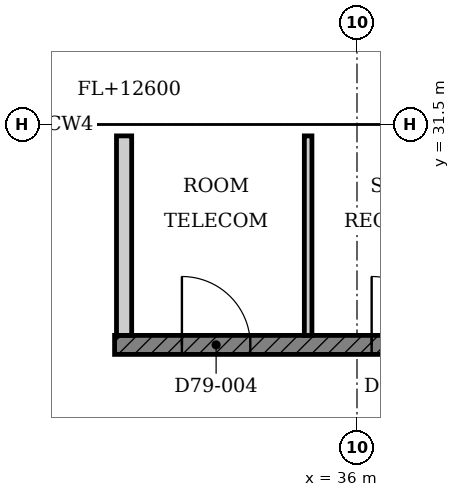
"""IFC4 building model, lengths in metres.
Left out: names, types, materials, properties, quantities, classifications, styles, units other than length and angle.
Written with IfcOpenShell. Run it as: python <this file> out.ifc"""

import sys

from ifc_helpers import new_model, si_unit, direction, frame, frame_2d, origin, place, context, subcontext, project, spatial, rectangle, extrude, element, fill, save


model = new_model("IFC4")
c1 = context("Model", 3, precision=1e-05, world=origin(), true_north=direction((0.0, 1.0)))
c2 = subcontext(c1, "Body", "Model", "MODEL_VIEW")
j1 = project(units=[si_unit("LENGTHUNIT", "METRE"), si_unit("PLANEANGLEUNIT", "RADIAN")], contexts=[c1])
p1 = place(None, origin())
s1 = spatial("IfcSite", under=j1, at=p1, CompositionType="ELEMENT")
p2 = place(p1, origin())
s2 = spatial("IfcBuilding", under=s1, at=p2, CompositionType="ELEMENT")
p3 = place(p2, frame((0.0, 0.0, 312.8)))
s3 = spatial("IfcBuildingStorey", under=s2, at=p3, CompositionType="ELEMENT", Elevation=312.8)
p4 = place(p3, frame((32.811, 28.6, 0.0), z_axis=(0.0, 0.0, 1.0), x_axis=(1.0, 0.0, 0.0)))
e1 = element("IfcWall", 1, at=p4, inside=s3, PredefinedType="SHEAR", context=c2, shape_type="SweptSolid", body=[
    extrude(rectangle(XDim=7.814, YDim=0.25, at=frame_2d((3.907, 0.0))), origin(), (0.0, 0.0, 1.0), 3.9),
])
p5 = place(p4, frame((5.854, 0.0, 0.0)))
e2 = element("IfcOpeningElement", 2, at=p5, cuts=e1, PredefinedType="OPENING", context=c2, shape_type="SweptSolid", body=[
    extrude(rectangle(XDim=1.1, YDim=2.1, at=frame_2d((0.55, 1.05))), frame((0.0, 0.135, 0.0), z_axis=(0.0, -1.0, 0.0), x_axis=(1.0, 0.0, 0.0)), (0.0, 0.0, 1.0), 0.27),
])
p6 = place(p4, frame((0.886, 0.0, 0.0)))
e3 = element("IfcOpeningElement", 3, at=p6, cuts=e1, PredefinedType="OPENING", context=c2, shape_type="SweptSolid", body=[
    extrude(rectangle(XDim=0.9, YDim=2.1, at=frame_2d((0.45, 1.05))), frame((0.0, 0.135, 0.0), z_axis=(0.0, -1.0, 0.0), x_axis=(1.0, 0.0, 0.0)), (0.0, 0.0, 1.0), 0.27),
])
p7 = place(p4, frame((3.382, 0.0, 0.0)))
e4 = element("IfcOpeningElement", 4, at=p7, cuts=e1, PredefinedType="OPENING", context=c2, shape_type="SweptSolid", body=[
    extrude(rectangle(XDim=0.9, YDim=2.1, at=frame_2d((0.45, 1.05))), frame((0.0, 0.135, 0.0), z_axis=(0.0, -1.0, 0.0), x_axis=(1.0, 0.0, 0.0)), (0.0, 0.0, 1.0), 0.27),
])
p8 = place(p3, frame((32.936, 28.725, 0.0), z_axis=(0.0, 0.0, 1.0), x_axis=(0.0, 1.0, 0.0)))
e5 = element("IfcWall", 5, at=p8, inside=s3, PredefinedType="PARTITIONING", context=c2, shape_type="SweptSolid", body=[
    extrude(rectangle(XDim=2.625, YDim=0.2, at=frame_2d((1.312, 0.0))), origin(), (0.0, 0.0, 1.0), 3.9),
])
p9 = place(p3, frame((35.357, 28.725, 0.0), z_axis=(0.0, 0.0, 1.0), x_axis=(0.0, 1.0, 0.0)))
e6 = element("IfcWall", 6, at=p9, inside=s3, PredefinedType="PARTITIONING", context=c2, shape_type="SweptSolid", body=[
    extrude(rectangle(XDim=2.625, YDim=0.1, at=frame_2d((1.312, 0.0))), origin(), (0.0, 0.0, 1.0), 3.9),
])
p10 = place(p6, origin())
e7 = element("IfcDoor", 7, at=p10, inside=s3, OperationType="SINGLE_SWING_LEFT", PredefinedType="DOOR", context=c2, shape_type="SweptSolid", body=[
    extrude(rectangle(XDim=0.9, YDim=2.1, at=frame_2d((0.45, 1.05))), frame((0.0, 0.025, 0.0), z_axis=(0.0, -1.0, 0.0), x_axis=(1.0, 0.0, 0.0)), (0.0, 0.0, 1.0), 0.05),
])
fill(e3, e7)
p11 = place(p7, origin())
e8 = element("IfcDoor", 8, at=p11, inside=s3, OperationType="SINGLE_SWING_LEFT", PredefinedType="DOOR", context=c2, shape_type="SweptSolid", body=[
    extrude(rectangle(XDim=0.9, YDim=2.1, at=frame_2d((0.45, 1.05))), frame((0.0, 0.025, 0.0), z_axis=(0.0, -1.0, 0.0), x_axis=(1.0, 0.0, 0.0)), (0.0, 0.0, 1.0), 0.05),
])
fill(e4, e8)
save(model, sys.argv[1])
